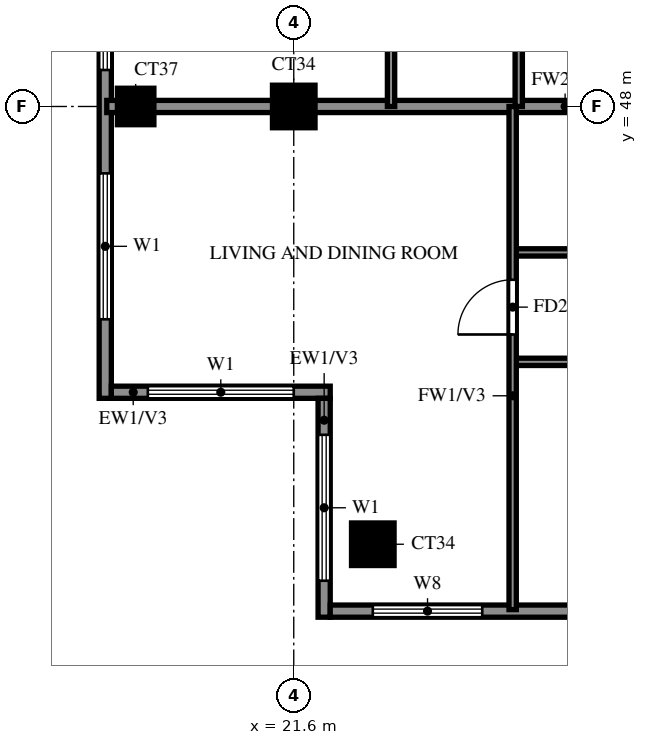
"""IFC4 building model, lengths in metres.
Left out: names, types, materials, properties, quantities, classifications, styles, units other than length and angle.
Written with IfcOpenShell. Run it as: python <this file> out.ifc"""

import sys

from ifc_helpers import new_model, si_unit, direction, frame, frame_2d, origin, origin_2d, place, context, subcontext, project, spatial, rectangle, extrude, source, transform, mapped, element, fill, save


model = new_model("IFC4")
c1 = context("Model", 3, precision=1e-05, world=origin(), true_north=direction((0.0, 1.0)))
c2 = subcontext(c1, "Body", "Model", "MODEL_VIEW")
j1 = project(units=[si_unit("LENGTHUNIT", "METRE"), si_unit("PLANEANGLEUNIT", "RADIAN")], contexts=[c1])
p1 = place(None, origin())
s1 = spatial("IfcSite", under=j1, at=p1, CompositionType="ELEMENT")
p2 = place(p1, origin())
s2 = spatial("IfcBuilding", under=s1, at=p2, CompositionType="ELEMENT")
p3 = place(p2, frame((0.0, 0.0, 253.5)))
s3 = spatial("IfcBuildingStorey", under=s2, at=p3, CompositionType="ELEMENT", Elevation=253.5)
m1 = source(origin(), c2, "Body", "SweptSolid", [
    extrude(rectangle(XDim=0.7, YDim=0.7, at=origin_2d()), origin(), (0.0, 0.0, 1.0), 3.22),
])
p4 = place(p3, frame((22.9, 40.8, 0.0), z_axis=(0.0, 0.0, 1.0), x_axis=(1.0, 0.0, 0.0)))
e1 = element("IfcColumn", 1, at=p4, inside=s3, PredefinedType="COLUMN", context=c2, shape_type="MappedRepresentation", body=[
    mapped(m1, transform((0.0, 0.0, 0.0))),
])
m2 = source(origin(), c2, "Body", "SweptSolid", [
    extrude(rectangle(XDim=0.6, YDim=0.6, at=origin_2d()), origin(), (0.0, 0.0, 1.0), 3.22),
])
p5 = place(p3, frame((19.0, 48.0, 0.0), z_axis=(0.0, 0.0, 1.0), x_axis=(1.0, 0.0, 0.0)))
e2 = element("IfcColumn", 2, at=p5, inside=s3, PredefinedType="COLUMN", context=c2, shape_type="MappedRepresentation", body=[
    mapped(m2, transform((0.0, 0.0, 0.0))),
])
p6 = place(p3, frame((21.6, 48.0, 0.0), z_axis=(0.0, 0.0, 1.0), x_axis=(1.0, 0.0, 0.0)))
e3 = element("IfcColumn", 3, at=p6, inside=s3, PredefinedType="COLUMN", context=c2, shape_type="MappedRepresentation", body=[
    mapped(m1, transform((0.0, 0.0, 0.0))),
])
p7 = place(p3, frame((18.5, 76.6, 0.0), z_axis=(0.0, 0.0, 1.0), x_axis=(0.0, -1.0, 0.0)))
e4 = element("IfcWall", 4, at=p7, inside=s3, PredefinedType="SOLIDWALL", context=c2, shape_type="SweptSolid", body=[
    extrude(rectangle(XDim=33.4, YDim=0.2, at=frame_2d((16.7, 0.0))), origin(), (0.0, 0.0, 1.0), 3.22),
])
p8 = place(p7, frame((15.1, 0.0, 0.0)))
e5 = element("IfcOpeningElement", 5, at=p8, cuts=e4, PredefinedType="OPENING", context=c2, shape_type="SweptSolid", body=[
    extrude(rectangle(XDim=1.8, YDim=2.4, at=frame_2d((0.9, 1.2))), frame((0.0, 0.11, 0.0), z_axis=(0.0, -1.0, 0.0), x_axis=(1.0, 0.0, 0.0)), (0.0, 0.0, 1.0), 0.22),
])
p9 = place(p7, frame((29.7, 0.0, 0.6)))
e6 = element("IfcOpeningElement", 6, at=p9, cuts=e4, PredefinedType="OPENING", context=c2, shape_type="SweptSolid", body=[
    extrude(rectangle(XDim=2.4, YDim=2.4, at=frame_2d((1.2, 1.2))), frame((0.0, 0.11, 0.0), z_axis=(0.0, -1.0, 0.0), x_axis=(1.0, 0.0, 0.0)), (0.0, 0.0, 1.0), 0.22),
])
p10 = place(p7, frame((25.6, 0.0, 0.6)))
e7 = element("IfcOpeningElement", 7, at=p10, cuts=e4, PredefinedType="OPENING", context=c2, shape_type="SweptSolid", body=[
    extrude(rectangle(XDim=2.4, YDim=2.4, at=frame_2d((1.2, 1.2))), frame((0.0, 0.11, 0.0), z_axis=(0.0, -1.0, 0.0), x_axis=(1.0, 0.0, 0.0)), (0.0, 0.0, 1.0), 0.22),
])
p11 = place(p7, frame((19.433, 0.0, 0.6)))
e8 = element("IfcOpeningElement", 8, at=p11, cuts=e4, PredefinedType="OPENING", context=c2, shape_type="SweptSolid", body=[
    extrude(rectangle(XDim=2.4, YDim=2.4, at=frame_2d((1.2, 1.2))), frame((0.0, 0.11, 0.0), z_axis=(0.0, -1.0, 0.0), x_axis=(1.0, 0.0, 0.0)), (0.0, 0.0, 1.0), 0.22),
])
p12 = place(p7, frame((22.167, 0.0, 0.6)))
e9 = element("IfcOpeningElement", 9, at=p12, cuts=e4, PredefinedType="OPENING", context=c2, shape_type="SweptSolid", body=[
    extrude(rectangle(XDim=2.4, YDim=2.4, at=frame_2d((1.2, 1.2))), frame((0.0, 0.11, 0.0), z_axis=(0.0, -1.0, 0.0), x_axis=(1.0, 0.0, 0.0)), (0.0, 0.0, 1.0), 0.22),
])
p13 = place(p7, frame((8.2, 0.0, 0.6)))
e10 = element("IfcOpeningElement", 10, at=p13, cuts=e4, PredefinedType="OPENING", context=c2, shape_type="SweptSolid", body=[
    extrude(rectangle(XDim=2.4, YDim=2.4, at=frame_2d((1.2, 1.2))), frame((0.0, 0.11, 0.0), z_axis=(0.0, -1.0, 0.0), x_axis=(1.0, 0.0, 0.0)), (0.0, 0.0, 1.0), 0.22),
])
p14 = place(p7, frame((12.7, 0.0, 0.6)))
e11 = element("IfcOpeningElement", 11, at=p14, cuts=e4, PredefinedType="OPENING", context=c2, shape_type="SweptSolid", body=[
    extrude(rectangle(XDim=1.2, YDim=2.4, at=frame_2d((0.6, 1.2))), frame((0.0, 0.11, 0.0), z_axis=(0.0, -1.0, 0.0), x_axis=(1.0, 0.0, 0.0)), (0.0, 0.0, 1.0), 0.22),
])
p15 = place(p7, frame((4.75, 0.0, 1.5)))
e12 = element("IfcOpeningElement", 12, at=p15, cuts=e4, PredefinedType="OPENING", context=c2, shape_type="SweptSolid", body=[
    extrude(rectangle(XDim=0.9, YDim=0.9, at=frame_2d((0.45, 0.45))), frame((0.0, 0.11, 0.0), z_axis=(0.0, -1.0, 0.0), x_axis=(1.0, 0.0, 0.0)), (0.0, 0.0, 1.0), 0.22),
])
p16 = place(p7, frame((0.6, 0.0, 0.6)))
e13 = element("IfcOpeningElement", 13, at=p16, cuts=e4, PredefinedType="OPENING", context=c2, shape_type="SweptSolid", body=[
    extrude(rectangle(XDim=2.4, YDim=2.4, at=frame_2d((1.2, 1.2))), frame((0.0, 0.11, 0.0), z_axis=(0.0, -1.0, 0.0), x_axis=(1.0, 0.0, 0.0)), (0.0, 0.0, 1.0), 0.22),
])
p17 = place(p3, frame((18.6, 43.3, 0.0), z_axis=(0.0, 0.0, 1.0), x_axis=(1.0, 0.0, 0.0)))
e14 = element("IfcWall", 14, at=p17, inside=s3, PredefinedType="SOLIDWALL", context=c2, shape_type="SweptSolid", body=[
    extrude(rectangle(XDim=3.6, YDim=0.2, at=frame_2d((1.8, 0.0))), origin(), (0.0, 0.0, 1.0), 3.22),
])
p18 = place(p17, frame((0.6, 0.0, 0.6)))
e15 = element("IfcOpeningElement", 15, at=p18, cuts=e14, PredefinedType="OPENING", context=c2, shape_type="SweptSolid", body=[
    extrude(rectangle(XDim=2.4, YDim=2.4, at=frame_2d((1.2, 1.2))), frame((0.0, 0.11, 0.0), z_axis=(0.0, -1.0, 0.0), x_axis=(1.0, 0.0, 0.0)), (0.0, 0.0, 1.0), 0.22),
])
p19 = place(p3, frame((22.1, 43.2, 0.0), z_axis=(0.0, 0.0, 1.0), x_axis=(0.0, -1.0, 0.0)))
e16 = element("IfcWall", 16, at=p19, inside=s3, PredefinedType="SOLIDWALL", context=c2, shape_type="SweptSolid", body=[
    extrude(rectangle(XDim=3.6, YDim=0.2, at=frame_2d((1.8, 0.0))), origin(), (0.0, 0.0, 1.0), 3.22),
])
p20 = place(p19, frame((0.6, 0.0, 0.6)))
e17 = element("IfcOpeningElement", 17, at=p20, cuts=e16, PredefinedType="OPENING", context=c2, shape_type="SweptSolid", body=[
    extrude(rectangle(XDim=2.4, YDim=2.4, at=frame_2d((1.2, 1.2))), frame((0.0, 0.11, 0.0), z_axis=(0.0, -1.0, 0.0), x_axis=(1.0, 0.0, 0.0)), (0.0, 0.0, 1.0), 0.22),
])
p21 = place(p3, frame((22.2, 39.7, 0.0), z_axis=(0.0, 0.0, 1.0), x_axis=(1.0, 0.0, 0.0)))
e18 = element("IfcWall", 18, at=p21, inside=s3, PredefinedType="SOLIDWALL", context=c2, shape_type="SweptSolid", body=[
    extrude(rectangle(XDim=19.8, YDim=0.2, at=frame_2d((9.9, 0.0))), origin(), (0.0, 0.0, 1.0), 3.22),
])
p22 = place(p21, frame((0.7, 0.0, 0.6)))
e19 = element("IfcOpeningElement", 19, at=p22, cuts=e18, PredefinedType="OPENING", context=c2, shape_type="SweptSolid", body=[
    extrude(rectangle(XDim=1.8, YDim=2.4, at=frame_2d((0.9, 1.2))), frame((0.0, 0.11, 0.0), z_axis=(0.0, -1.0, 0.0), x_axis=(1.0, 0.0, 0.0)), (0.0, 0.0, 1.0), 0.22),
])
p23 = place(p21, frame((4.35, 0.0, 1.5)))
e20 = element("IfcOpeningElement", 20, at=p23, cuts=e18, PredefinedType="OPENING", context=c2, shape_type="SweptSolid", body=[
    extrude(rectangle(XDim=0.9, YDim=0.9, at=frame_2d((0.45, 0.45))), frame((0.0, 0.11, 0.0), z_axis=(0.0, -1.0, 0.0), x_axis=(1.0, 0.0, 0.0)), (0.0, 0.0, 1.0), 0.22),
])
p24 = place(p21, frame((7.8, 0.0, 0.6)))
e21 = element("IfcOpeningElement", 21, at=p24, cuts=e18, PredefinedType="OPENING", context=c2, shape_type="SweptSolid", body=[
    extrude(rectangle(XDim=2.4, YDim=2.4, at=frame_2d((1.2, 1.2))), frame((0.0, 0.11, 0.0), z_axis=(0.0, -1.0, 0.0), x_axis=(1.0, 0.0, 0.0)), (0.0, 0.0, 1.0), 0.22),
])
p25 = place(p3, frame((18.525, 48.0, 0.0), z_axis=(0.0, 0.0, 1.0), x_axis=(1.0, 0.0, 0.0)))
e22 = element("IfcWall", 22, at=p25, inside=s3, PredefinedType="SOLIDWALL", context=c2, shape_type="SweptSolid", body=[
    extrude(rectangle(XDim=15.075, YDim=0.2, at=frame_2d((7.538, 0.0))), origin(), (0.0, 0.0, 1.0), 3.22),
])
p26 = place(p3, frame((25.2, 43.8, 0.0), z_axis=(0.0, 0.0, 1.0), x_axis=(1.0, 0.0, 0.0)))
e23 = element("IfcWall", 23, at=p26, inside=s3, PredefinedType="PARTITIONING", context=c2, shape_type="SweptSolid", body=[
    extrude(rectangle(XDim=8.4, YDim=0.12, at=frame_2d((4.2, 0.0))), origin(), (0.0, 0.0, 1.0), 3.22),
])
p27 = place(p26, frame((1.35, 0.0, 0.0)))
e24 = element("IfcOpeningElement", 24, at=p27, cuts=e23, PredefinedType="OPENING", context=c2, shape_type="SweptSolid", body=[
    extrude(rectangle(XDim=0.9, YDim=2.1, at=frame_2d((0.45, 1.05))), frame((0.0, 0.07, 0.0), z_axis=(0.0, -1.0, 0.0), x_axis=(1.0, 0.0, 0.0)), (0.0, 0.0, 1.0), 0.14),
])
p28 = place(p26, frame((5.55, 0.0, 0.0)))
e25 = element("IfcOpeningElement", 25, at=p28, cuts=e23, PredefinedType="OPENING", context=c2, shape_type="SweptSolid", body=[
    extrude(rectangle(XDim=0.9, YDim=2.1, at=frame_2d((0.45, 1.05))), frame((0.0, 0.07, 0.0), z_axis=(0.0, -1.0, 0.0), x_axis=(1.0, 0.0, 0.0)), (0.0, 0.0, 1.0), 0.14),
])
p29 = place(p3, frame((25.2, 45.6, 0.0), z_axis=(0.0, 0.0, 1.0), x_axis=(1.0, 0.0, 0.0)))
e26 = element("IfcWall", 26, at=p29, inside=s3, PredefinedType="PARTITIONING", context=c2, shape_type="SweptSolid", body=[
    extrude(rectangle(XDim=6.0, YDim=0.12, at=frame_2d((3.0, 0.0))), origin(), (0.0, 0.0, 1.0), 3.22),
])
p30 = place(p29, frame((2.55, 0.0, 0.0)))
e27 = element("IfcOpeningElement", 27, at=p30, cuts=e26, PredefinedType="OPENING", context=c2, shape_type="SweptSolid", body=[
    extrude(rectangle(XDim=0.9, YDim=2.1, at=frame_2d((0.45, 1.05))), frame((0.0, 0.07, 0.0), z_axis=(0.0, -1.0, 0.0), x_axis=(1.0, 0.0, 0.0)), (0.0, 0.0, 1.0), 0.14),
])
p31 = place(p3, frame((23.2, 48.0, 0.0), z_axis=(0.0, 0.0, 1.0), x_axis=(0.0, 1.0, 0.0)))
e28 = element("IfcWall", 28, at=p31, inside=s3, PredefinedType="PARTITIONING", context=c2, shape_type="SweptSolid", body=[
    extrude(rectangle(XDim=21.6, YDim=0.12, at=frame_2d((10.8, 0.0))), origin(), (0.0, 0.0, 1.0), 3.22),
])
p32 = place(p31, frame((1.35, 0.0, 0.0)))
e29 = element("IfcOpeningElement", 29, at=p32, cuts=e28, PredefinedType="OPENING", context=c2, shape_type="SweptSolid", body=[
    extrude(rectangle(XDim=0.9, YDim=2.1, at=frame_2d((0.45, 1.05))), frame((0.0, 0.07, 0.0), z_axis=(0.0, -1.0, 0.0), x_axis=(1.0, 0.0, 0.0)), (0.0, 0.0, 1.0), 0.14),
])
p33 = place(p31, frame((7.95, 0.0, 0.0)))
e30 = element("IfcOpeningElement", 30, at=p33, cuts=e28, PredefinedType="OPENING", context=c2, shape_type="SweptSolid", body=[
    extrude(rectangle(XDim=1.5, YDim=2.1, at=frame_2d((0.75, 1.05))), frame((0.0, 0.07, 0.0), z_axis=(0.0, -1.0, 0.0), x_axis=(1.0, 0.0, 0.0)), (0.0, 0.0, 1.0), 0.14),
])
p34 = place(p31, frame((12.15, 0.0, 0.0)))
e31 = element("IfcOpeningElement", 31, at=p34, cuts=e28, PredefinedType="OPENING", context=c2, shape_type="SweptSolid", body=[
    extrude(rectangle(XDim=0.9, YDim=2.1, at=frame_2d((0.45, 1.05))), frame((0.0, 0.07, 0.0), z_axis=(0.0, -1.0, 0.0), x_axis=(1.0, 0.0, 0.0)), (0.0, 0.0, 1.0), 0.14),
])
p35 = place(p31, frame((17.55, 0.0, 0.0)))
e32 = element("IfcOpeningElement", 32, at=p35, cuts=e28, PredefinedType="OPENING", context=c2, shape_type="SweptSolid", body=[
    extrude(rectangle(XDim=0.9, YDim=2.1, at=frame_2d((0.45, 1.05))), frame((0.0, 0.07, 0.0), z_axis=(0.0, -1.0, 0.0), x_axis=(1.0, 0.0, 0.0)), (0.0, 0.0, 1.0), 0.14),
])
p36 = place(p3, frame((25.2, 39.725, 0.0), z_axis=(0.0, 0.0, 1.0), x_axis=(0.0, 1.0, 0.0)))
e33 = element("IfcWall", 33, at=p36, inside=s3, PredefinedType="PARTITIONING", context=c2, shape_type="SweptSolid", body=[
    extrude(rectangle(XDim=8.275, YDim=0.12, at=frame_2d((4.137, 0.0))), origin(), (0.0, 0.0, 1.0), 3.22),
])
p37 = place(p36, frame((4.525, 0.0, 0.0)))
e34 = element("IfcOpeningElement", 34, at=p37, cuts=e33, PredefinedType="OPENING", context=c2, shape_type="SweptSolid", body=[
    extrude(rectangle(XDim=0.9, YDim=2.1, at=frame_2d((0.45, 1.05))), frame((0.0, 0.07, 0.0), z_axis=(0.0, -1.0, 0.0), x_axis=(1.0, 0.0, 0.0)), (0.0, 0.0, 1.0), 0.14),
])
p38 = place(p3, frame((25.3, 48.0, 0.0), z_axis=(0.0, 0.0, 1.0), x_axis=(0.0, 1.0, 0.0)))
e35 = element("IfcWall", 35, at=p38, inside=s3, PredefinedType="PARTITIONING", context=c2, shape_type="SweptSolid", body=[
    extrude(rectangle(XDim=3.6, YDim=0.12, at=frame_2d((1.8, 0.0))), origin(), (0.0, 0.0, 1.0), 3.22),
])
p39 = place(p38, frame((1.4, 0.0, 0.0)))
e36 = element("IfcOpeningElement", 36, at=p39, cuts=e35, PredefinedType="OPENING", context=c2, shape_type="SweptSolid", body=[
    extrude(rectangle(XDim=0.8, YDim=2.1, at=frame_2d((0.4, 1.05))), frame((0.0, 0.07, 0.0), z_axis=(0.0, -1.0, 0.0), x_axis=(1.0, 0.0, 0.0)), (0.0, 0.0, 1.0), 0.14),
])
p40 = place(p9, origin())
e37 = element("IfcWindow", 37, at=p40, inside=s3, PartitioningType="DOUBLE_PANEL_VERTICAL", PredefinedType="WINDOW", context=c2, shape_type="SweptSolid", body=[
    extrude(rectangle(XDim=2.4, YDim=2.4, at=frame_2d((1.2, 1.2))), frame((0.0, 0.03, 0.0), z_axis=(0.0, -1.0, 0.0), x_axis=(1.0, 0.0, 0.0)), (0.0, 0.0, 1.0), 0.06),
])
fill(e6, e37)
p41 = place(p10, origin())
e38 = element("IfcWindow", 38, at=p41, inside=s3, PartitioningType="DOUBLE_PANEL_VERTICAL", PredefinedType="WINDOW", context=c2, shape_type="SweptSolid", body=[
    extrude(rectangle(XDim=2.4, YDim=2.4, at=frame_2d((1.2, 1.2))), frame((0.0, 0.03, 0.0), z_axis=(0.0, -1.0, 0.0), x_axis=(1.0, 0.0, 0.0)), (0.0, 0.0, 1.0), 0.06),
])
fill(e7, e38)
p42 = place(p18, origin())
e39 = element("IfcWindow", 39, at=p42, inside=s3, PartitioningType="DOUBLE_PANEL_VERTICAL", PredefinedType="WINDOW", context=c2, shape_type="SweptSolid", body=[
    extrude(rectangle(XDim=2.4, YDim=2.4, at=frame_2d((1.2, 1.2))), frame((0.0, 0.03, 0.0), z_axis=(0.0, -1.0, 0.0), x_axis=(1.0, 0.0, 0.0)), (0.0, 0.0, 1.0), 0.06),
])
fill(e15, e39)
p43 = place(p20, origin())
e40 = element("IfcWindow", 40, at=p43, inside=s3, PartitioningType="DOUBLE_PANEL_VERTICAL", PredefinedType="WINDOW", context=c2, shape_type="SweptSolid", body=[
    extrude(rectangle(XDim=2.4, YDim=2.4, at=frame_2d((1.2, 1.2))), frame((0.0, 0.03, 0.0), z_axis=(0.0, -1.0, 0.0), x_axis=(1.0, 0.0, 0.0)), (0.0, 0.0, 1.0), 0.06),
])
fill(e17, e40)
p44 = place(p22, origin())
e41 = element("IfcWindow", 41, at=p44, inside=s3, PartitioningType="DOUBLE_PANEL_VERTICAL", PredefinedType="WINDOW", context=c2, shape_type="SweptSolid", body=[
    extrude(rectangle(XDim=1.8, YDim=2.4, at=frame_2d((0.9, 1.2))), frame((0.0, 0.03, 0.0), z_axis=(0.0, -1.0, 0.0), x_axis=(1.0, 0.0, 0.0)), (0.0, 0.0, 1.0), 0.06),
])
fill(e19, e41)
p45 = place(p37, origin())
e42 = element("IfcDoor", 42, at=p45, inside=s3, OperationType="SINGLE_SWING_RIGHT", PredefinedType="DOOR", context=c2, shape_type="SweptSolid", body=[
    extrude(rectangle(XDim=0.9, YDim=2.1, at=frame_2d((0.45, 1.05))), frame((0.0, 0.025, 0.0), z_axis=(0.0, -1.0, 0.0), x_axis=(1.0, 0.0, 0.0)), (0.0, 0.0, 1.0), 0.05),
])
fill(e34, e42)
save(model, sys.argv[1])
